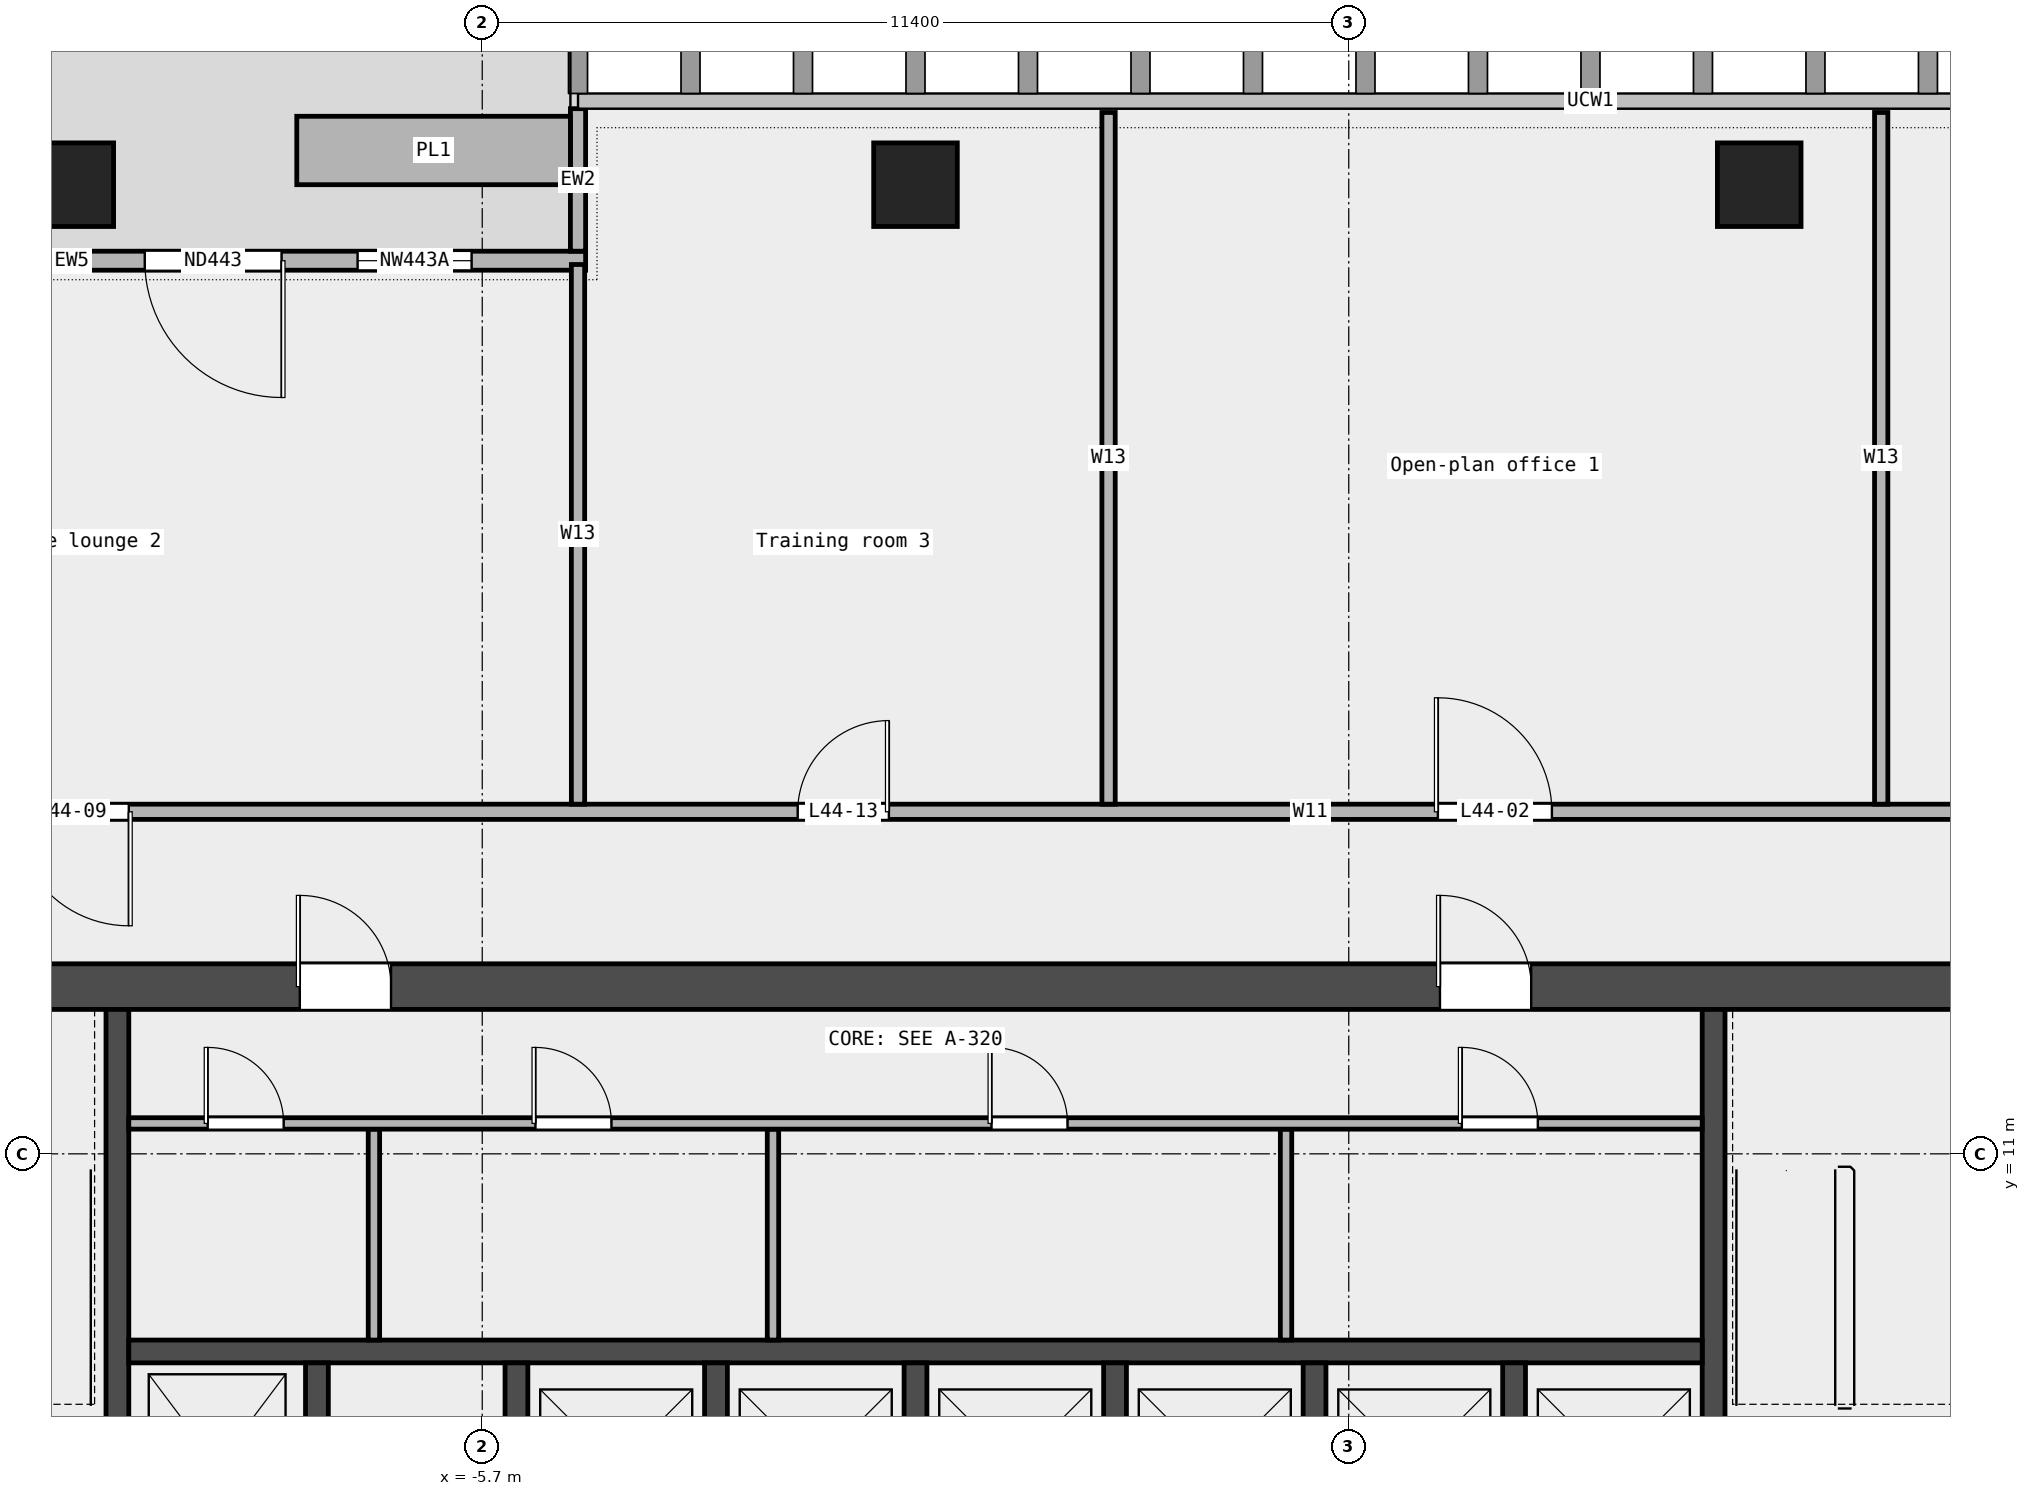
"""IFC4 building model, lengths in metres.
Left out: names, types, materials, properties, quantities, classifications, styles, units other than length and angle.
Written with IfcOpenShell. Run it as: python <this file> out.ifc"""

import sys

from ifc_helpers import new_model, si_unit, direction, frame, frame_2d, origin, origin_2d, place, context, subcontext, project, spatial, rectangle, extrude, element, fill, save


model = new_model("IFC4")
c1 = context("Model", 3, precision=1e-05, world=origin(), true_north=direction((0.0, 1.0)))
c2 = subcontext(c1, "Body", "Model", "MODEL_VIEW")
j1 = project(units=[si_unit("LENGTHUNIT", "METRE"), si_unit("PLANEANGLEUNIT", "RADIAN")], contexts=[c1])
p1 = place(None, origin())
s1 = spatial("IfcSite", under=j1, at=p1, CompositionType="ELEMENT")
p2 = place(p1, origin())
s2 = spatial("IfcBuilding", under=s1, at=p2, CompositionType="ELEMENT")
p3 = place(p2, frame((0.0, 0.0, 211.0)))
s3 = spatial("IfcBuildingStorey", under=s2, at=p3, CompositionType="ELEMENT", Elevation=211.0)
for number, where, z_axis, x_axis in (
    (1, (11.1, 23.75, 0.0), (0.0, 0.0, 1.0), (1.0, 0.0, 0.0)),
    (2, (0.0, 23.75, 0.0), (0.0, 0.0, 1.0), (1.0, 0.0, 0.0)),
    (3, (-11.1, 23.75, 0.0), (0.0, 0.0, 1.0), (1.0, 0.0, 0.0)),
):
    element("IfcColumn", number, at=place(p3, frame(where, z_axis=z_axis, x_axis=x_axis)), inside=s3, PredefinedType="COLUMN", context=c2, shape_type="SweptSolid", body=[
        extrude(rectangle(XDim=1.1, YDim=1.1, at=origin_2d()), origin(), (0.0, 0.0, 1.0), 3.6),
    ])
p4 = place(p3, frame((-4.34, 22.75, 0.0), z_axis=(0.0, 0.0, 1.0), x_axis=(-1.0, 0.0, 0.0)))
e4 = element("IfcWall", 4, at=p4, inside=s3, PredefinedType="STANDARD", context=c2, shape_type="SweptSolid", body=[
    extrude(rectangle(XDim=13.52, YDim=0.25, at=frame_2d((6.76, 0.0))), origin(), (0.0, 0.0, 1.0), 3.6),
])
p5 = place(p4, frame((1.5, 0.0, 0.45)))
e5 = element("IfcOpeningElement", 5, at=p5, cuts=e4, PredefinedType="OPENING", context=c2, shape_type="SweptSolid", body=[
    extrude(rectangle(XDim=1.5, YDim=2.4, at=frame_2d((0.75, 1.2))), frame((0.0, 0.137, 0.0), z_axis=(0.0, -1.0, 0.0), x_axis=(1.0, 0.0, 0.0)), (0.0, 0.0, 1.0), 0.274),
])
p6 = place(p4, frame((4.0, 0.0, 0.0)))
e6 = element("IfcOpeningElement", 6, at=p6, cuts=e4, PredefinedType="OPENING", context=c2, shape_type="SweptSolid", body=[
    extrude(rectangle(XDim=1.8, YDim=2.4, at=frame_2d((0.9, 1.2))), frame((0.0, 0.137, 0.0), z_axis=(0.0, -1.0, 0.0), x_axis=(1.0, 0.0, 0.0)), (0.0, 0.0, 1.0), 0.274),
])
p7 = place(p4, frame((10.5, 0.0, 0.45)))
e7 = element("IfcOpeningElement", 7, at=p7, cuts=e4, PredefinedType="OPENING", context=c2, shape_type="SweptSolid", body=[
    extrude(rectangle(XDim=1.5, YDim=2.4, at=frame_2d((0.75, 1.2))), frame((0.0, 0.137, 0.0), z_axis=(0.0, -1.0, 0.0), x_axis=(1.0, 0.0, 0.0)), (0.0, 0.0, 1.0), 0.274),
])
p8 = place(p3, frame((-4.44, 24.75, 0.0), z_axis=(0.0, 0.0, 1.0), x_axis=(0.0, -1.0, 0.0)))
e8 = element("IfcWall", 8, at=p8, inside=s3, PredefinedType="STANDARD", context=c2, shape_type="SweptSolid", body=[
    extrude(rectangle(XDim=1.875, YDim=0.2, at=frame_2d((0.938, 0.0))), origin(), (0.0, 0.0, 1.0), 3.6),
])
p9 = place(p3, frame((-4.54, 24.2, 0.0), z_axis=(0.0, 0.0, 1.0), x_axis=(-1.0, 0.0, 0.0)))
e9 = element("IfcWall", 9, at=p9, inside=s3, PredefinedType="STANDARD", context=c2, shape_type="SweptSolid", body=[
    extrude(rectangle(XDim=3.6, YDim=0.9, at=frame_2d((1.8, 0.0))), origin(), (0.0, 0.0, 1.0), 0.7),
])
p10 = place(p3, frame((-17.76, 15.5, 0.0), z_axis=(0.0, 0.0, 1.0), x_axis=(1.0, 0.0, 0.0)))
e10 = element("IfcWall", 10, at=p10, inside=s3, PredefinedType="PARTITIONING", context=c2, shape_type="SweptSolid", body=[
    extrude(rectangle(XDim=45.91, YDim=0.2, at=frame_2d((22.955, 0.0))), origin(), (0.0, 0.0, 1.0), 3.6),
])
p11 = place(p10, frame((37.337, 0.0, 0.0)))
e11 = element("IfcOpeningElement", 11, at=p11, cuts=e10, PredefinedType="OPENING", context=c2, shape_type="SweptSolid", body=[
    extrude(rectangle(XDim=1.5, YDim=2.1, at=frame_2d((0.75, 1.05))), frame((0.0, 0.112, 0.0), z_axis=(0.0, -1.0, 0.0), x_axis=(1.0, 0.0, 0.0)), (0.0, 0.0, 1.0), 0.224),
])
p12 = place(p10, frame((24.633, 0.0, 0.0)))
e12 = element("IfcOpeningElement", 12, at=p12, cuts=e10, PredefinedType="OPENING", context=c2, shape_type="SweptSolid", body=[
    extrude(rectangle(XDim=1.5, YDim=2.1, at=frame_2d((0.75, 1.05))), frame((0.0, 0.112, 0.0), z_axis=(0.0, -1.0, 0.0), x_axis=(1.0, 0.0, 0.0)), (0.0, 0.0, 1.0), 0.224),
])
p13 = place(p10, frame((5.91, 0.0, 0.0)))
e13 = element("IfcOpeningElement", 13, at=p13, cuts=e10, PredefinedType="OPENING", context=c2, shape_type="SweptSolid", body=[
    extrude(rectangle(XDim=1.5, YDim=2.1, at=frame_2d((0.75, 1.05))), frame((0.0, 0.112, 0.0), z_axis=(0.0, -1.0, 0.0), x_axis=(1.0, 0.0, 0.0)), (0.0, 0.0, 1.0), 0.224),
])
p14 = place(p10, frame((16.21, 0.0, 0.0)))
e14 = element("IfcOpeningElement", 14, at=p14, cuts=e10, PredefinedType="OPENING", context=c2, shape_type="SweptSolid", body=[
    extrude(rectangle(XDim=1.2, YDim=2.1, at=frame_2d((0.6, 1.05))), frame((0.0, 0.112, 0.0), z_axis=(0.0, -1.0, 0.0), x_axis=(1.0, 0.0, 0.0)), (0.0, 0.0, 1.0), 0.224),
])
p15 = place(p3, frame((-4.44, 15.6, 0.0), z_axis=(0.0, 0.0, 1.0), x_axis=(0.0, 1.0, 0.0)))
e15 = element("IfcWall", 15, at=p15, inside=s3, PredefinedType="PARTITIONING", context=c2, shape_type="SweptSolid", body=[
    extrude(rectangle(XDim=7.1, YDim=0.175, at=frame_2d((3.55, 0.0))), origin(), (0.0, 0.0, 1.0), 3.6),
])
for number, where, z_axis, x_axis in (
    (16, (2.54, 15.6, 0.0), (0.0, 0.0, 1.0), (0.0, 1.0, 0.0)),
    (17, (12.705, 15.6, 0.0), (0.0, 0.0, 1.0), (0.0, 1.0, 0.0)),
):
    element("IfcWall", number, at=place(p3, frame(where, z_axis=z_axis, x_axis=x_axis)), inside=s3, PredefinedType="PARTITIONING", context=c2, shape_type="SweptSolid", body=[
        extrude(rectangle(XDim=9.1, YDim=0.175, at=frame_2d((4.55, 0.0))), origin(), (0.0, 0.0, 1.0), 3.6),
    ])
p16 = place(p3, frame((-14.4, 13.2, 0.0), z_axis=(0.0, 0.0, 1.0), x_axis=(1.0, 0.0, 0.0)))
e18 = element("IfcWall", 18, at=p16, inside=s3, PredefinedType="SHEAR", context=c2, shape_type="SweptSolid", body=[
    extrude(rectangle(XDim=28.8, YDim=0.6, at=frame_2d((14.4, 0.0))), origin(), (0.0, 0.0, 1.0), 3.7),
])
p17 = place(p16, frame((6.3, 0.0, 0.0)))
e19 = element("IfcOpeningElement", 19, at=p17, cuts=e18, PredefinedType="OPENING", context=c2, shape_type="SweptSolid", body=[
    extrude(rectangle(XDim=1.2, YDim=2.1, at=frame_2d((0.6, 1.05))), frame((0.0, 0.312, 0.0), z_axis=(0.0, -1.0, 0.0), x_axis=(1.0, 0.0, 0.0)), (0.0, 0.0, 1.0), 0.624),
])
p18 = place(p16, frame((21.3, 0.0, 0.0)))
e20 = element("IfcOpeningElement", 20, at=p18, cuts=e18, PredefinedType="OPENING", context=c2, shape_type="SweptSolid", body=[
    extrude(rectangle(XDim=1.2, YDim=2.1, at=frame_2d((0.6, 1.05))), frame((0.0, 0.312, 0.0), z_axis=(0.0, -1.0, 0.0), x_axis=(1.0, 0.0, 0.0)), (0.0, 0.0, 1.0), 0.624),
])
for number, where, z_axis, x_axis in (
    (21, (-10.5, 5.25, 0.0), (0.0, 0.0, 1.0), (0.0, 1.0, 0.0)),
    (22, (10.5, 5.25, 0.0), (0.0, 0.0, 1.0), (0.0, 1.0, 0.0)),
):
    element("IfcWall", number, at=place(p3, frame(where, z_axis=z_axis, x_axis=x_axis)), inside=s3, PredefinedType="SHEAR", context=c2, shape_type="SweptSolid", body=[
        extrude(rectangle(XDim=7.65, YDim=0.3, at=frame_2d((3.825, 0.0))), origin(), (0.0, 0.0, 1.0), 3.7),
    ])
p19 = place(p3, frame((-10.35, 8.4, 0.0), z_axis=(0.0, 0.0, 1.0), x_axis=(1.0, 0.0, 0.0)))
e23 = element("IfcWall", 23, at=p19, inside=s3, PredefinedType="SOLIDWALL", context=c2, shape_type="SweptSolid", body=[
    extrude(rectangle(XDim=20.7, YDim=0.3, at=frame_2d((10.35, 0.0))), origin(), (0.0, 0.0, 1.0), 3.7),
])
for number, where, z_axis, x_axis in (
    (24, (-7.875, 5.55, 0.0), (0.0, 0.0, 1.0), (0.0, 1.0, 0.0)),
    (25, (-5.25, 5.55, 0.0), (0.0, 0.0, 1.0), (0.0, 1.0, 0.0)),
    (26, (-2.625, 5.55, 0.0), (0.0, 0.0, 1.0), (0.0, 1.0, 0.0)),
    (27, (0.0, 5.55, 0.0), (0.0, 0.0, 1.0), (0.0, 1.0, 0.0)),
    (28, (2.625, 5.55, 0.0), (0.0, 0.0, 1.0), (0.0, 1.0, 0.0)),
    (29, (5.25, 5.55, 0.0), (0.0, 0.0, 1.0), (0.0, 1.0, 0.0)),
    (30, (7.875, 5.55, 0.0), (0.0, 0.0, 1.0), (0.0, 1.0, 0.0)),
):
    element("IfcWall", number, at=place(p3, frame(where, z_axis=z_axis, x_axis=x_axis)), inside=s3, PredefinedType="SOLIDWALL", context=c2, shape_type="SweptSolid", body=[
        extrude(rectangle(XDim=2.7, YDim=0.3, at=frame_2d((1.35, 0.0))), origin(), (0.0, 0.0, 1.0), 3.7),
    ])
for number, where, z_axis, x_axis in (
    (31, (-7.125, 8.55, 0.0), (0.0, 0.0, 1.0), (0.0, 1.0, 0.0)),
    (32, (-1.875, 8.55, 0.0), (0.0, 0.0, 1.0), (0.0, 1.0, 0.0)),
    (33, (4.875, 8.55, 0.0), (0.0, 0.0, 1.0), (0.0, 1.0, 0.0)),
):
    element("IfcWall", number, at=place(p3, frame(where, z_axis=z_axis, x_axis=x_axis)), inside=s3, PredefinedType="PARTITIONING", context=c2, shape_type="SweptSolid", body=[
        extrude(rectangle(XDim=2.775, YDim=0.15, at=frame_2d((1.387, 0.0))), origin(), (0.0, 0.0, 1.0), 3.7),
    ])
p20 = place(p3, frame((-10.35, 11.4, 0.0), z_axis=(0.0, 0.0, 1.0), x_axis=(1.0, 0.0, 0.0)))
e34 = element("IfcWall", 34, at=p20, inside=s3, PredefinedType="PARTITIONING", context=c2, shape_type="SweptSolid", body=[
    extrude(rectangle(XDim=20.7, YDim=0.15, at=frame_2d((10.35, 0.0))), origin(), (0.0, 0.0, 1.0), 3.7),
])
p21 = place(p20, frame((1.038, 0.0, 0.0)))
e35 = element("IfcOpeningElement", 35, at=p21, cuts=e34, PredefinedType="OPENING", context=c2, shape_type="SweptSolid", body=[
    extrude(rectangle(XDim=1.0, YDim=2.1, at=frame_2d((0.5, 1.05))), frame((0.0, 0.087, 0.0), z_axis=(0.0, -1.0, 0.0), x_axis=(1.0, 0.0, 0.0)), (0.0, 0.0, 1.0), 0.174),
])
p22 = place(p20, frame((5.35, 0.0, 0.0)))
e36 = element("IfcOpeningElement", 36, at=p22, cuts=e34, PredefinedType="OPENING", context=c2, shape_type="SweptSolid", body=[
    extrude(rectangle(XDim=1.0, YDim=2.1, at=frame_2d((0.5, 1.05))), frame((0.0, 0.087, 0.0), z_axis=(0.0, -1.0, 0.0), x_axis=(1.0, 0.0, 0.0)), (0.0, 0.0, 1.0), 0.174),
])
p23 = place(p20, frame((11.35, 0.0, 0.0)))
e37 = element("IfcOpeningElement", 37, at=p23, cuts=e34, PredefinedType="OPENING", context=c2, shape_type="SweptSolid", body=[
    extrude(rectangle(XDim=1.0, YDim=2.1, at=frame_2d((0.5, 1.05))), frame((0.0, 0.087, 0.0), z_axis=(0.0, -1.0, 0.0), x_axis=(1.0, 0.0, 0.0)), (0.0, 0.0, 1.0), 0.174),
])
p24 = place(p20, frame((17.538, 0.0, 0.0)))
e38 = element("IfcOpeningElement", 38, at=p24, cuts=e34, PredefinedType="OPENING", context=c2, shape_type="SweptSolid", body=[
    extrude(rectangle(XDim=1.0, YDim=2.1, at=frame_2d((0.5, 1.05))), frame((0.0, 0.087, 0.0), z_axis=(0.0, -1.0, 0.0), x_axis=(1.0, 0.0, 0.0)), (0.0, 0.0, 1.0), 0.174),
])
p25 = place(p5, origin())
e39 = element("IfcWindow", 39, at=p25, inside=s3, PartitioningType="SINGLE_PANEL", PredefinedType="WINDOW", context=c2, shape_type="SweptSolid", body=[
    extrude(rectangle(XDim=1.5, YDim=2.4, at=frame_2d((0.75, 1.2))), frame((0.0, 0.03, 0.0), z_axis=(0.0, -1.0, 0.0), x_axis=(1.0, 0.0, 0.0)), (0.0, 0.0, 1.0), 0.06),
])
fill(e5, e39)
p26 = place(p6, origin())
e40 = element("IfcDoor", 40, at=p26, inside=s3, OperationType="DOUBLE_DOOR_SINGLE_SWING", PredefinedType="DOOR", context=c2, shape_type="SweptSolid", body=[
    extrude(rectangle(XDim=1.8, YDim=2.4, at=frame_2d((0.9, 1.2))), frame((0.0, 0.025, 0.0), z_axis=(0.0, -1.0, 0.0), x_axis=(1.0, 0.0, 0.0)), (0.0, 0.0, 1.0), 0.05),
])
fill(e6, e40)
p27 = place(p12, origin())
e41 = element("IfcDoor", 41, at=p27, inside=s3, OperationType="DOUBLE_DOOR_SINGLE_SWING", PredefinedType="DOOR", context=c2, shape_type="SweptSolid", body=[
    extrude(rectangle(XDim=1.5, YDim=2.1, at=frame_2d((0.75, 1.05))), frame((0.0, 0.025, 0.0), z_axis=(0.0, -1.0, 0.0), x_axis=(1.0, 0.0, 0.0)), (0.0, 0.0, 1.0), 0.05),
])
fill(e12, e41)
p28 = place(p13, origin())
e42 = element("IfcDoor", 42, at=p28, inside=s3, OperationType="DOUBLE_DOOR_SINGLE_SWING", PredefinedType="DOOR", context=c2, shape_type="SweptSolid", body=[
    extrude(rectangle(XDim=1.5, YDim=2.1, at=frame_2d((0.75, 1.05))), frame((0.0, 0.025, 0.0), z_axis=(0.0, -1.0, 0.0), x_axis=(1.0, 0.0, 0.0)), (0.0, 0.0, 1.0), 0.05),
])
fill(e13, e42)
p29 = place(p14, origin())
e43 = element("IfcDoor", 43, at=p29, inside=s3, OperationType="SINGLE_SWING_RIGHT", PredefinedType="DOOR", context=c2, shape_type="SweptSolid", body=[
    extrude(rectangle(XDim=1.2, YDim=2.1, at=frame_2d((0.6, 1.05))), frame((0.0, 0.025, 0.0), z_axis=(0.0, -1.0, 0.0), x_axis=(1.0, 0.0, 0.0)), (0.0, 0.0, 1.0), 0.05),
])
fill(e14, e43)
p30 = place(p21, origin())
e44 = element("IfcDoor", 44, at=p30, inside=s3, OperationType="SINGLE_SWING_LEFT", PredefinedType="DOOR", context=c2, shape_type="SweptSolid", body=[
    extrude(rectangle(XDim=1.0, YDim=2.1, at=frame_2d((0.5, 1.05))), frame((0.0, 0.025, 0.0), z_axis=(0.0, -1.0, 0.0), x_axis=(1.0, 0.0, 0.0)), (0.0, 0.0, 1.0), 0.05),
])
fill(e35, e44)
p31 = place(p22, origin())
e45 = element("IfcDoor", 45, at=p31, inside=s3, OperationType="SINGLE_SWING_LEFT", PredefinedType="DOOR", context=c2, shape_type="SweptSolid", body=[
    extrude(rectangle(XDim=1.0, YDim=2.1, at=frame_2d((0.5, 1.05))), frame((0.0, 0.025, 0.0), z_axis=(0.0, -1.0, 0.0), x_axis=(1.0, 0.0, 0.0)), (0.0, 0.0, 1.0), 0.05),
])
fill(e36, e45)
p32 = place(p23, origin())
e46 = element("IfcDoor", 46, at=p32, inside=s3, OperationType="SINGLE_SWING_LEFT", PredefinedType="DOOR", context=c2, shape_type="SweptSolid", body=[
    extrude(rectangle(XDim=1.0, YDim=2.1, at=frame_2d((0.5, 1.05))), frame((0.0, 0.025, 0.0), z_axis=(0.0, -1.0, 0.0), x_axis=(1.0, 0.0, 0.0)), (0.0, 0.0, 1.0), 0.05),
])
fill(e37, e46)
p33 = place(p24, origin())
e47 = element("IfcDoor", 47, at=p33, inside=s3, OperationType="SINGLE_SWING_LEFT", PredefinedType="DOOR", context=c2, shape_type="SweptSolid", body=[
    extrude(rectangle(XDim=1.0, YDim=2.1, at=frame_2d((0.5, 1.05))), frame((0.0, 0.025, 0.0), z_axis=(0.0, -1.0, 0.0), x_axis=(1.0, 0.0, 0.0)), (0.0, 0.0, 1.0), 0.05),
])
fill(e38, e47)
p34 = place(p17, origin())
e48 = element("IfcDoor", 48, at=p34, inside=s3, OperationType="SINGLE_SWING_LEFT", PredefinedType="DOOR", context=c2, shape_type="SweptSolid", body=[
    extrude(rectangle(XDim=1.2, YDim=2.1, at=frame_2d((0.6, 1.05))), frame((0.0, 0.025, 0.0), z_axis=(0.0, -1.0, 0.0), x_axis=(1.0, 0.0, 0.0)), (0.0, 0.0, 1.0), 0.05),
])
fill(e19, e48)
p35 = place(p18, origin())
e49 = element("IfcDoor", 49, at=p35, inside=s3, OperationType="SINGLE_SWING_RIGHT", PredefinedType="DOOR", context=c2, shape_type="SweptSolid", body=[
    extrude(rectangle(XDim=1.2, YDim=2.1, at=frame_2d((0.6, 1.05))), frame((0.0, 0.025, 0.0), z_axis=(0.0, -1.0, 0.0), x_axis=(1.0, 0.0, 0.0)), (0.0, 0.0, 1.0), 0.05),
])
fill(e20, e49)
save(model, sys.argv[1])
